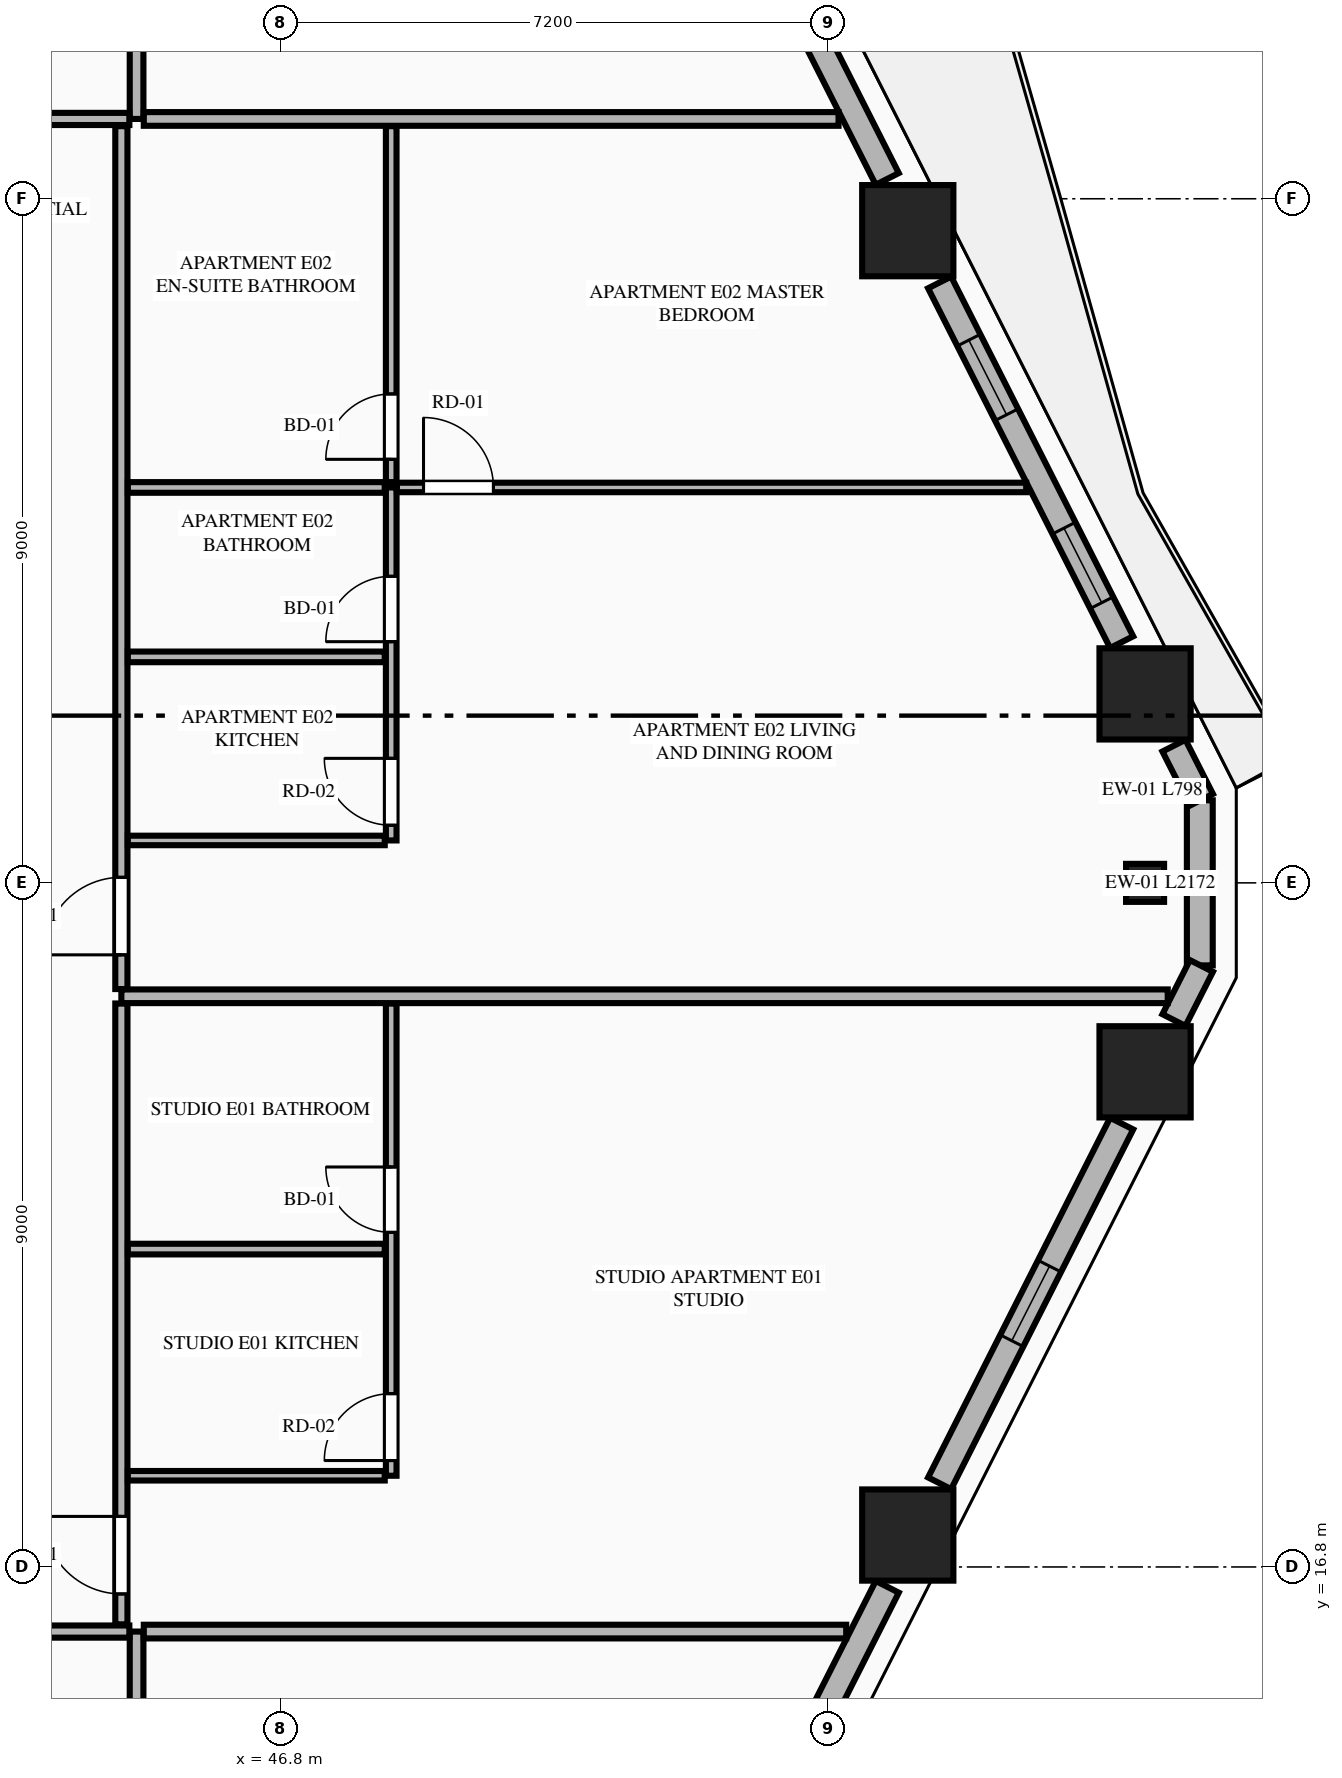
"""IFC4 building model, lengths in metres.
Left out: names, types, materials, properties, quantities, classifications, styles, units other than length and angle.
Written with IfcOpenShell. Run it as: python <this file> out.ifc"""

import sys

from ifc_helpers import new_model, si_unit, direction, frame, frame_2d, origin, origin_2d, place, context, subcontext, project, spatial, rectangle, extrude, element, fill, save


model = new_model("IFC4")
c1 = context("Model", 3, precision=1e-05, world=origin(), true_north=direction((0.0, 1.0)))
c2 = subcontext(c1, "Body", "Model", "MODEL_VIEW")
j1 = project(units=[si_unit("LENGTHUNIT", "METRE"), si_unit("PLANEANGLEUNIT", "RADIAN")], contexts=[c1])
p1 = place(None, origin())
s1 = spatial("IfcSite", under=j1, at=p1, CompositionType="ELEMENT")
p2 = place(p1, origin())
s2 = spatial("IfcBuilding", under=s1, at=p2, CompositionType="ELEMENT")
p3 = place(p2, frame((0.0, 0.0, 42.65)))
s3 = spatial("IfcBuildingStorey", under=s2, at=p3, CompositionType="ELEMENT", Elevation=42.65)
for number, where, z_axis, x_axis in (
    (1, (55.046, 17.22, 0.0), (0.0, 0.0, 1.0), (1.0, 0.0, 0.0)),
    (2, (58.168, 23.314, 0.0), (0.0, 0.0, 1.0), (1.0, 0.0, 0.0)),
    (3, (58.168, 28.286, 0.0), (0.0, 0.0, 1.0), (1.0, 0.0, 0.0)),
    (4, (55.046, 34.38, 0.0), (0.0, 0.0, 1.0), (1.0, 0.0, 0.0)),
):
    element("IfcColumn", number, at=place(p3, frame(where, z_axis=z_axis, x_axis=x_axis)), inside=s3, PredefinedType="COLUMN", context=c2, shape_type="SweptSolid", body=[
        extrude(rectangle(XDim=1.2, YDim=1.2, at=origin_2d()), origin(), (0.0, 0.0, 1.0), 3.55),
    ])
p4 = place(p3, frame((58.168, 25.8, 0.0), z_axis=(0.0, 0.0, 1.0), x_axis=(0.0, 1.0, 0.0)))
e5 = element("IfcColumn", 5, at=p4, inside=s3, PredefinedType="PILASTER", context=c2, shape_type="SweptSolid", body=[
    extrude(rectangle(XDim=0.5, YDim=0.35, at=origin_2d()), origin(), (0.0, 0.0, 1.0), 3.55),
])
p5 = place(p3, frame((58.888, 24.714, 0.0), z_axis=(0.0, 0.0, 1.0), x_axis=(0.0, 1.0, 0.0)))
e6 = element("IfcWall", 6, at=p5, inside=s3, PredefinedType="STANDARD", context=c2, shape_type="SweptSolid", body=[
    extrude(rectangle(XDim=2.172, YDim=0.34, at=frame_2d((1.086, 0.0))), origin(), (0.0, 0.0, 1.0), 3.33),
])
p6 = place(p3, frame((52.271, 11.59, 0.0), z_axis=(0.0, 0.0, 1.0), x_axis=(0.451592100298, 0.892224509273, 0.0)))
e7 = element("IfcWall", 7, at=p6, inside=s3, PredefinedType="STANDARD", context=c2, shape_type="SweptSolid", body=[
    extrude(rectangle(XDim=5.547, YDim=0.34, at=frame_2d((2.773, 0.0))), origin(), (0.0, 0.0, 1.0), 2.787),
])
p7 = place(p6, frame((2.223, 0.0, 0.75)))
e8 = element("IfcOpeningElement", 8, at=p7, cuts=e7, PredefinedType="OPENING", context=c2, shape_type="SweptSolid", body=[
    extrude(rectangle(XDim=1.1, YDim=1.887, at=frame_2d((0.55, 0.943))), frame((0.0, 0.18, 0.0), z_axis=(0.0, -1.0, 0.0), x_axis=(1.0, 0.0, 0.0)), (0.0, 0.0, 1.0), 0.36),
])
p8 = place(p3, frame((55.465, 17.901, 0.0), z_axis=(0.0, 0.0, 1.0), x_axis=(0.451572088722, 0.892234637686, 0.0)))
e9 = element("IfcWall", 9, at=p8, inside=s3, PredefinedType="STANDARD", context=c2, shape_type="SweptSolid", body=[
    extrude(rectangle(XDim=5.304, YDim=0.34, at=frame_2d((2.652, 0.0))), origin(), (0.0, 0.0, 1.0), 2.787),
])
p9 = place(p8, frame((2.102, 0.0, 0.75)))
e10 = element("IfcOpeningElement", 10, at=p9, cuts=e9, PredefinedType="OPENING", context=c2, shape_type="SweptSolid", body=[
    extrude(rectangle(XDim=1.1, YDim=1.887, at=frame_2d((0.55, 0.943))), frame((0.0, 0.18, 0.0), z_axis=(0.0, -1.0, 0.0), x_axis=(1.0, 0.0, 0.0)), (0.0, 0.0, 1.0), 0.36),
])
for number, where, z_axis, x_axis in (
    (11, (58.548, 23.995, 0.0), (0.0, 0.0, 1.0), (0.452, 0.892, 0.0)),
    (12, (58.909, 26.893, 0.0), (0.0, 0.0, 1.0), (-0.452, 0.892, 0.0)),
):
    element("IfcWall", number, at=place(p3, frame(where, z_axis=z_axis, x_axis=x_axis)), inside=s3, PredefinedType="STANDARD", context=c2, shape_type="SweptSolid", body=[
        extrude(rectangle(XDim=0.798, YDim=0.34, at=frame_2d((0.399, 0.0))), origin(), (0.0, 0.0, 1.0), 3.33),
    ])
p10 = place(p3, frame((57.86, 28.967, 0.0), z_axis=(0.0, 0.0, 1.0), x_axis=(-0.451590635984, 0.892225250422, 0.0)))
e13 = element("IfcWall", 13, at=p10, inside=s3, PredefinedType="STANDARD", context=c2, shape_type="SweptSolid", body=[
    extrude(rectangle(XDim=5.303, YDim=0.34, at=frame_2d((2.652, 0.0))), origin(), (0.0, 0.0, 1.0), 2.787),
])
p11 = place(p10, frame((0.581, 0.0, 0.75)))
e14 = element("IfcOpeningElement", 14, at=p11, cuts=e13, PredefinedType="OPENING", context=c2, shape_type="SweptSolid", body=[
    extrude(rectangle(XDim=1.1, YDim=1.887, at=frame_2d((0.55, 0.943))), frame((0.0, 0.18, 0.0), z_axis=(0.0, -1.0, 0.0), x_axis=(1.0, 0.0, 0.0)), (0.0, 0.0, 1.0), 0.36),
])
p12 = place(p10, frame((3.353, 0.0, 0.75)))
e15 = element("IfcOpeningElement", 15, at=p12, cuts=e13, PredefinedType="OPENING", context=c2, shape_type="SweptSolid", body=[
    extrude(rectangle(XDim=1.1, YDim=1.887, at=frame_2d((0.55, 0.943))), frame((0.0, 0.18, 0.0), z_axis=(0.0, -1.0, 0.0), x_axis=(1.0, 0.0, 0.0)), (0.0, 0.0, 1.0), 0.36),
])
p13 = place(p3, frame((54.776, 35.061, 0.0), z_axis=(0.0, 0.0, 1.0), x_axis=(-0.451592100298, 0.892224509273, 0.0)))
e16 = element("IfcWall", 16, at=p13, inside=s3, PredefinedType="STANDARD", context=c2, shape_type="SweptSolid", body=[
    extrude(rectangle(XDim=5.547, YDim=0.34, at=frame_2d((2.773, 0.0))), origin(), (0.0, 0.0, 1.0), 2.787),
])
p14 = place(p13, frame((2.791, 0.0, 0.0)))
e17 = element("IfcOpeningElement", 17, at=p14, cuts=e16, PredefinedType="OPENING", context=c2, shape_type="SweptSolid", body=[
    extrude(rectangle(XDim=1.1, YDim=2.25, at=frame_2d((0.55, 1.125))), frame((0.0, 0.18, 0.0), z_axis=(0.0, -1.0, 0.0), x_axis=(1.0, 0.0, 0.0)), (0.0, 0.0, 1.0), 0.36),
])
p15 = place(p3, frame((44.9, 2.455, 0.0), z_axis=(0.0, 0.0, 1.0), x_axis=(0.0, 1.0, 0.0)))
e18 = element("IfcWall", 18, at=p15, inside=s3, PredefinedType="PARTITIONING", context=c2, shape_type="SweptSolid", body=[
    extrude(rectangle(XDim=13.495, YDim=0.18, at=frame_2d((6.748, 0.0))), origin(), (0.0, 0.0, 1.0), 3.33),
])
p16 = place(p3, frame((36.617, 15.95, 0.0), z_axis=(0.0, 0.0, 1.0), x_axis=(1.0, 0.0, 0.0)))
e19 = element("IfcWall", 19, at=p16, inside=s3, PredefinedType="PARTITIONING", context=c2, shape_type="SweptSolid", body=[
    extrude(rectangle(XDim=8.188, YDim=0.16, at=frame_2d((4.094, 0.0))), origin(), (0.0, 0.0, 1.0), 3.33),
])
p17 = place(p16, frame((0.355, 0.0, 0.0)))
e20 = element("IfcOpeningElement", 20, at=p17, cuts=e19, PredefinedType="OPENING", context=c2, shape_type="SweptSolid", body=[
    extrude(rectangle(XDim=1.02, YDim=2.25, at=frame_2d((0.51, 1.125))), frame((0.0, 0.09, 0.0), z_axis=(0.0, -1.0, 0.0), x_axis=(1.0, 0.0, 0.0)), (0.0, 0.0, 1.0), 0.18),
])
p18 = place(p3, frame((44.9, 35.85, 0.0), z_axis=(0.0, 0.0, 1.0), x_axis=(0.0, 1.0, 0.0)))
e21 = element("IfcWall", 21, at=p18, inside=s3, PredefinedType="PARTITIONING", context=c2, shape_type="SweptSolid", body=[
    extrude(rectangle(XDim=13.295, YDim=0.18, at=frame_2d((6.647, 0.0))), origin(), (0.0, 0.0, 1.0), 3.33),
])
p19 = place(p3, frame((19.995, 35.85, 0.0), z_axis=(0.0, 0.0, 1.0), x_axis=(1.0, 0.0, 0.0)))
e22 = element("IfcWall", 22, at=p19, inside=s3, PredefinedType="PARTITIONING", context=c2, shape_type="SweptSolid", body=[
    extrude(rectangle(XDim=24.81, YDim=0.16, at=frame_2d((12.405, 0.0))), origin(), (0.0, 0.0, 1.0), 3.33),
])
p20 = place(p19, frame((0.705, 0.0, 0.0)))
e23 = element("IfcOpeningElement", 23, at=p20, cuts=e22, PredefinedType="OPENING", context=c2, shape_type="SweptSolid", body=[
    extrude(rectangle(XDim=1.35, YDim=2.35, at=frame_2d((0.675, 1.175))), frame((0.0, 0.09, 0.0), z_axis=(0.0, -1.0, 0.0), x_axis=(1.0, 0.0, 0.0)), (0.0, 0.0, 1.0), 0.18),
])
p21 = place(p3, frame((44.995, 15.95, 0.0), z_axis=(0.0, 0.0, 1.0), x_axis=(1.0, 0.0, 0.0)))
e24 = element("IfcWall", 24, at=p21, inside=s3, PredefinedType="PARTITIONING", context=c2, shape_type="SweptSolid", body=[
    extrude(rectangle(XDim=9.241, YDim=0.18, at=frame_2d((4.621, 0.0))), origin(), (0.0, 0.0, 1.0), 3.33),
])
p22 = place(p3, frame((44.995, 35.85, 0.0), z_axis=(0.0, 0.0, 1.0), x_axis=(1.0, 0.0, 0.0)))
e25 = element("IfcWall", 25, at=p22, inside=s3, PredefinedType="PARTITIONING", context=c2, shape_type="SweptSolid", body=[
    extrude(rectangle(XDim=9.14, YDim=0.18, at=frame_2d((4.57, 0.0))), origin(), (0.0, 0.0, 1.0), 3.33),
])
p23 = place(p3, frame((44.7, 16.045, 0.0), z_axis=(0.0, 0.0, 1.0), x_axis=(0.0, 1.0, 0.0)))
e26 = element("IfcWall", 26, at=p23, inside=s3, PredefinedType="PARTITIONING", context=c2, shape_type="SweptSolid", body=[
    extrude(rectangle(XDim=8.168, YDim=0.16, at=frame_2d((4.084, 0.0))), origin(), (0.0, 0.0, 1.0), 2.7),
])
p24 = place(p23, frame((0.4, 0.0, 0.0)))
e27 = element("IfcOpeningElement", 27, at=p24, cuts=e26, PredefinedType="OPENING", context=c2, shape_type="SweptSolid", body=[
    extrude(rectangle(XDim=1.02, YDim=2.25, at=frame_2d((0.51, 1.125))), frame((0.0, 0.09, 0.0), z_axis=(0.0, -1.0, 0.0), x_axis=(1.0, 0.0, 0.0)), (0.0, 0.0, 1.0), 0.18),
])
p25 = place(p3, frame((44.785, 18.0, 0.0), z_axis=(0.0, 0.0, 1.0), x_axis=(1.0, 0.0, 0.0)))
e28 = element("IfcWall", 28, at=p25, inside=s3, PredefinedType="PARTITIONING", context=c2, shape_type="SweptSolid", body=[
    extrude(rectangle(XDim=3.38, YDim=0.125, at=frame_2d((1.69, 0.0))), origin(), (0.0, 0.0, 1.0), 2.7),
])
p26 = place(p3, frame((48.25, 18.0, 0.0), z_axis=(0.0, 0.0, 1.0), x_axis=(0.0, 1.0, 0.0)))
e29 = element("IfcWall", 29, at=p26, inside=s3, PredefinedType="PLUMBINGWALL", context=c2, shape_type="SweptSolid", body=[
    extrude(rectangle(XDim=6.213, YDim=0.14, at=frame_2d((3.106, 0.0))), origin(), (0.0, 0.0, 1.0), 3.33),
])
p27 = place(p26, frame((3.202, 0.0, 0.0)))
e30 = element("IfcOpeningElement", 30, at=p27, cuts=e29, PredefinedType="OPENING", context=c2, shape_type="SweptSolid", body=[
    extrude(rectangle(XDim=0.86, YDim=2.1, at=frame_2d((0.43, 1.05))), frame((0.0, 0.08, 0.0), z_axis=(0.0, -1.0, 0.0), x_axis=(1.0, 0.0, 0.0)), (0.0, 0.0, 1.0), 0.16),
])
p28 = place(p26, frame((0.2, 0.0, 0.0)))
e31 = element("IfcOpeningElement", 31, at=p28, cuts=e29, PredefinedType="OPENING", context=c2, shape_type="SweptSolid", body=[
    extrude(rectangle(XDim=0.88, YDim=2.15, at=frame_2d((0.44, 1.075))), frame((0.0, 0.08, 0.0), z_axis=(0.0, -1.0, 0.0), x_axis=(1.0, 0.0, 0.0)), (0.0, 0.0, 1.0), 0.16),
])
p29 = place(p3, frame((44.785, 20.982, 0.0), z_axis=(0.0, 0.0, 1.0), x_axis=(1.0, 0.0, 0.0)))
e32 = element("IfcWall", 32, at=p29, inside=s3, PredefinedType="PLUMBINGWALL", context=c2, shape_type="SweptSolid", body=[
    extrude(rectangle(XDim=3.38, YDim=0.14, at=frame_2d((1.69, 0.0))), origin(), (0.0, 0.0, 1.0), 3.33),
])
p30 = place(p3, frame((44.7, 24.308, 0.0), z_axis=(0.0, 0.0, 1.0), x_axis=(1.0, 0.0, 0.0)))
e33 = element("IfcWall", 33, at=p30, inside=s3, PredefinedType="PARTITIONING", context=c2, shape_type="SweptSolid", body=[
    extrude(rectangle(XDim=13.766, YDim=0.18, at=frame_2d((6.883, 0.0))), origin(), (0.0, 0.0, 1.0), 3.33),
])
p31 = place(p3, frame((44.7, 24.403, 0.0), z_axis=(0.0, 0.0, 1.0), x_axis=(0.0, 1.0, 0.0)))
e34 = element("IfcWall", 34, at=p31, inside=s3, PredefinedType="PARTITIONING", context=c2, shape_type="SweptSolid", body=[
    extrude(rectangle(XDim=11.352, YDim=0.16, at=frame_2d((5.676, 0.0))), origin(), (0.0, 0.0, 1.0), 2.7),
])
p32 = place(p31, frame((0.45, 0.0, 0.0)))
e35 = element("IfcOpeningElement", 35, at=p32, cuts=e34, PredefinedType="OPENING", context=c2, shape_type="SweptSolid", body=[
    extrude(rectangle(XDim=1.02, YDim=2.25, at=frame_2d((0.51, 1.125))), frame((0.0, 0.09, 0.0), z_axis=(0.0, -1.0, 0.0), x_axis=(1.0, 0.0, 0.0)), (0.0, 0.0, 1.0), 0.18),
])
p33 = place(p3, frame((44.785, 26.358, 0.0), z_axis=(0.0, 0.0, 1.0), x_axis=(1.0, 0.0, 0.0)))
e36 = element("IfcWall", 36, at=p33, inside=s3, PredefinedType="PARTITIONING", context=c2, shape_type="SweptSolid", body=[
    extrude(rectangle(XDim=3.38, YDim=0.125, at=frame_2d((1.69, 0.0))), origin(), (0.0, 0.0, 1.0), 3.33),
])
p34 = place(p3, frame((48.25, 26.358, 0.0), z_axis=(0.0, 0.0, 1.0), x_axis=(0.0, 1.0, 0.0)))
e37 = element("IfcWall", 37, at=p34, inside=s3, PredefinedType="PLUMBINGWALL", context=c2, shape_type="SweptSolid", body=[
    extrude(rectangle(XDim=4.644, YDim=0.14, at=frame_2d((2.322, 0.0))), origin(), (0.0, 0.0, 1.0), 3.33),
])
p35 = place(p34, frame((0.2, 0.0, 0.0)))
e38 = element("IfcOpeningElement", 38, at=p35, cuts=e37, PredefinedType="OPENING", context=c2, shape_type="SweptSolid", body=[
    extrude(rectangle(XDim=0.88, YDim=2.15, at=frame_2d((0.44, 1.075))), frame((0.0, 0.08, 0.0), z_axis=(0.0, -1.0, 0.0), x_axis=(1.0, 0.0, 0.0)), (0.0, 0.0, 1.0), 0.16),
])
p36 = place(p34, frame((2.615, 0.0, 0.0)))
e39 = element("IfcOpeningElement", 39, at=p36, cuts=e37, PredefinedType="OPENING", context=c2, shape_type="SweptSolid", body=[
    extrude(rectangle(XDim=0.86, YDim=2.1, at=frame_2d((0.43, 1.05))), frame((0.0, 0.08, 0.0), z_axis=(0.0, -1.0, 0.0), x_axis=(1.0, 0.0, 0.0)), (0.0, 0.0, 1.0), 0.16),
])
p37 = place(p3, frame((48.25, 31.072, 0.0), z_axis=(0.0, 0.0, 1.0), x_axis=(0.0, 1.0, 0.0)))
e40 = element("IfcWall", 40, at=p37, inside=s3, PredefinedType="PLUMBINGWALL", context=c2, shape_type="SweptSolid", body=[
    extrude(rectangle(XDim=4.683, YDim=0.14, at=frame_2d((2.341, 0.0))), origin(), (0.0, 0.0, 1.0), 3.33),
])
p38 = place(p37, frame((0.3, 0.0, 0.0)))
e41 = element("IfcOpeningElement", 41, at=p38, cuts=e40, PredefinedType="OPENING", context=c2, shape_type="SweptSolid", body=[
    extrude(rectangle(XDim=0.86, YDim=2.1, at=frame_2d((0.43, 1.05))), frame((0.0, 0.08, 0.0), z_axis=(0.0, -1.0, 0.0), x_axis=(1.0, 0.0, 0.0)), (0.0, 0.0, 1.0), 0.16),
])
p39 = place(p3, frame((44.785, 31.002, 0.0), z_axis=(0.0, 0.0, 1.0), x_axis=(1.0, 0.0, 0.0)))
e42 = element("IfcWall", 42, at=p39, inside=s3, PredefinedType="PLUMBINGWALL", context=c2, shape_type="SweptSolid", body=[
    extrude(rectangle(XDim=3.38, YDim=0.14, at=frame_2d((1.69, 0.0))), origin(), (0.0, 0.0, 1.0), 3.33),
])
p40 = place(p3, frame((48.325, 31.002, 0.0), z_axis=(0.0, 0.0, 1.0), x_axis=(1.0, 0.0, 0.0)))
e43 = element("IfcWall", 43, at=p40, inside=s3, PredefinedType="PARTITIONING", context=c2, shape_type="SweptSolid", body=[
    extrude(rectangle(XDim=8.279, YDim=0.125, at=frame_2d((4.14, 0.0))), origin(), (0.0, 0.0, 1.0), 3.33),
])
p41 = place(p40, frame((0.35, 0.0, 0.0)))
e44 = element("IfcOpeningElement", 44, at=p41, cuts=e43, PredefinedType="OPENING", context=c2, shape_type="SweptSolid", body=[
    extrude(rectangle(XDim=0.92, YDim=2.15, at=frame_2d((0.46, 1.075))), frame((0.0, 0.073, 0.0), z_axis=(0.0, -1.0, 0.0), x_axis=(1.0, 0.0, 0.0)), (0.0, 0.0, 1.0), 0.145),
])
p42 = place(p3, frame((44.785, 28.773, 0.0), z_axis=(0.0, 0.0, 1.0), x_axis=(1.0, 0.0, 0.0)))
e45 = element("IfcWall", 45, at=p42, inside=s3, PredefinedType="PLUMBINGWALL", context=c2, shape_type="SweptSolid", body=[
    extrude(rectangle(XDim=3.38, YDim=0.14, at=frame_2d((1.69, 0.0))), origin(), (0.0, 0.0, 1.0), 3.33),
])
p43 = place(p9, origin())
e46 = element("IfcWindow", 46, at=p43, inside=s3, PartitioningType="SINGLE_PANEL", PredefinedType="WINDOW", context=c2, shape_type="SweptSolid", body=[
    extrude(rectangle(XDim=1.1, YDim=1.887, at=frame_2d((0.55, 0.943))), frame((0.0, 0.03, 0.0), z_axis=(0.0, -1.0, 0.0), x_axis=(1.0, 0.0, 0.0)), (0.0, 0.0, 1.0), 0.06),
])
fill(e10, e46)
p44 = place(p11, origin())
e47 = element("IfcWindow", 47, at=p44, inside=s3, PartitioningType="SINGLE_PANEL", PredefinedType="WINDOW", context=c2, shape_type="SweptSolid", body=[
    extrude(rectangle(XDim=1.1, YDim=1.887, at=frame_2d((0.55, 0.943))), frame((0.0, 0.03, 0.0), z_axis=(0.0, -1.0, 0.0), x_axis=(1.0, 0.0, 0.0)), (0.0, 0.0, 1.0), 0.06),
])
fill(e14, e47)
p45 = place(p27, origin())
e48 = element("IfcDoor", 48, at=p45, inside=s3, OperationType="SINGLE_SWING_RIGHT", PredefinedType="DOOR", context=c2, shape_type="SweptSolid", body=[
    extrude(rectangle(XDim=0.86, YDim=2.1, at=frame_2d((0.43, 1.05))), frame((0.0, 0.025, 0.0), z_axis=(0.0, -1.0, 0.0), x_axis=(1.0, 0.0, 0.0)), (0.0, 0.0, 1.0), 0.05),
])
fill(e30, e48)
p46 = place(p24, origin())
e49 = element("IfcDoor", 49, at=p46, inside=s3, OperationType="SINGLE_SWING_RIGHT", PredefinedType="DOOR", context=c2, shape_type="SweptSolid", body=[
    extrude(rectangle(XDim=1.02, YDim=2.25, at=frame_2d((0.51, 1.125))), frame((0.0, 0.025, 0.0), z_axis=(0.0, -1.0, 0.0), x_axis=(1.0, 0.0, 0.0)), (0.0, 0.0, 1.0), 0.05),
])
fill(e27, e49)
p47 = place(p28, origin())
e50 = element("IfcDoor", 50, at=p47, inside=s3, OperationType="SINGLE_SWING_LEFT", PredefinedType="DOOR", context=c2, shape_type="SweptSolid", body=[
    extrude(rectangle(XDim=0.88, YDim=2.15, at=frame_2d((0.44, 1.075))), frame((0.0, 0.025, 0.0), z_axis=(0.0, -1.0, 0.0), x_axis=(1.0, 0.0, 0.0)), (0.0, 0.0, 1.0), 0.05),
])
fill(e31, e50)
p48 = place(p35, origin())
e51 = element("IfcDoor", 51, at=p48, inside=s3, OperationType="SINGLE_SWING_RIGHT", PredefinedType="DOOR", context=c2, shape_type="SweptSolid", body=[
    extrude(rectangle(XDim=0.88, YDim=2.15, at=frame_2d((0.44, 1.075))), frame((0.0, 0.025, 0.0), z_axis=(0.0, -1.0, 0.0), x_axis=(1.0, 0.0, 0.0)), (0.0, 0.0, 1.0), 0.05),
])
fill(e38, e51)
p49 = place(p36, origin())
e52 = element("IfcDoor", 52, at=p49, inside=s3, OperationType="SINGLE_SWING_LEFT", PredefinedType="DOOR", context=c2, shape_type="SweptSolid", body=[
    extrude(rectangle(XDim=0.86, YDim=2.1, at=frame_2d((0.43, 1.05))), frame((0.0, 0.025, 0.0), z_axis=(0.0, -1.0, 0.0), x_axis=(1.0, 0.0, 0.0)), (0.0, 0.0, 1.0), 0.05),
])
fill(e39, e52)
p50 = place(p38, origin())
e53 = element("IfcDoor", 53, at=p50, inside=s3, OperationType="SINGLE_SWING_LEFT", PredefinedType="DOOR", context=c2, shape_type="SweptSolid", body=[
    extrude(rectangle(XDim=0.86, YDim=2.1, at=frame_2d((0.43, 1.05))), frame((0.0, 0.025, 0.0), z_axis=(0.0, -1.0, 0.0), x_axis=(1.0, 0.0, 0.0)), (0.0, 0.0, 1.0), 0.05),
])
fill(e41, e53)
p51 = place(p32, origin())
e54 = element("IfcDoor", 54, at=p51, inside=s3, OperationType="SINGLE_SWING_LEFT", PredefinedType="DOOR", context=c2, shape_type="SweptSolid", body=[
    extrude(rectangle(XDim=1.02, YDim=2.25, at=frame_2d((0.51, 1.125))), frame((0.0, 0.025, 0.0), z_axis=(0.0, -1.0, 0.0), x_axis=(1.0, 0.0, 0.0)), (0.0, 0.0, 1.0), 0.05),
])
fill(e35, e54)
p52 = place(p41, origin())
e55 = element("IfcDoor", 55, at=p52, inside=s3, OperationType="SINGLE_SWING_LEFT", PredefinedType="DOOR", context=c2, shape_type="SweptSolid", body=[
    extrude(rectangle(XDim=0.92, YDim=2.15, at=frame_2d((0.46, 1.075))), frame((0.0, 0.025, 0.0), z_axis=(0.0, -1.0, 0.0), x_axis=(1.0, 0.0, 0.0)), (0.0, 0.0, 1.0), 0.05),
])
fill(e44, e55)
p53 = place(p12, origin())
e56 = element("IfcWindow", 56, at=p53, inside=s3, PartitioningType="SINGLE_PANEL", PredefinedType="WINDOW", context=c2, shape_type="SweptSolid", body=[
    extrude(rectangle(XDim=1.1, YDim=1.887, at=frame_2d((0.55, 0.943))), frame((0.0, 0.03, 0.0), z_axis=(0.0, -1.0, 0.0), x_axis=(1.0, 0.0, 0.0)), (0.0, 0.0, 1.0), 0.06),
])
fill(e15, e56)
save(model, sys.argv[1])
